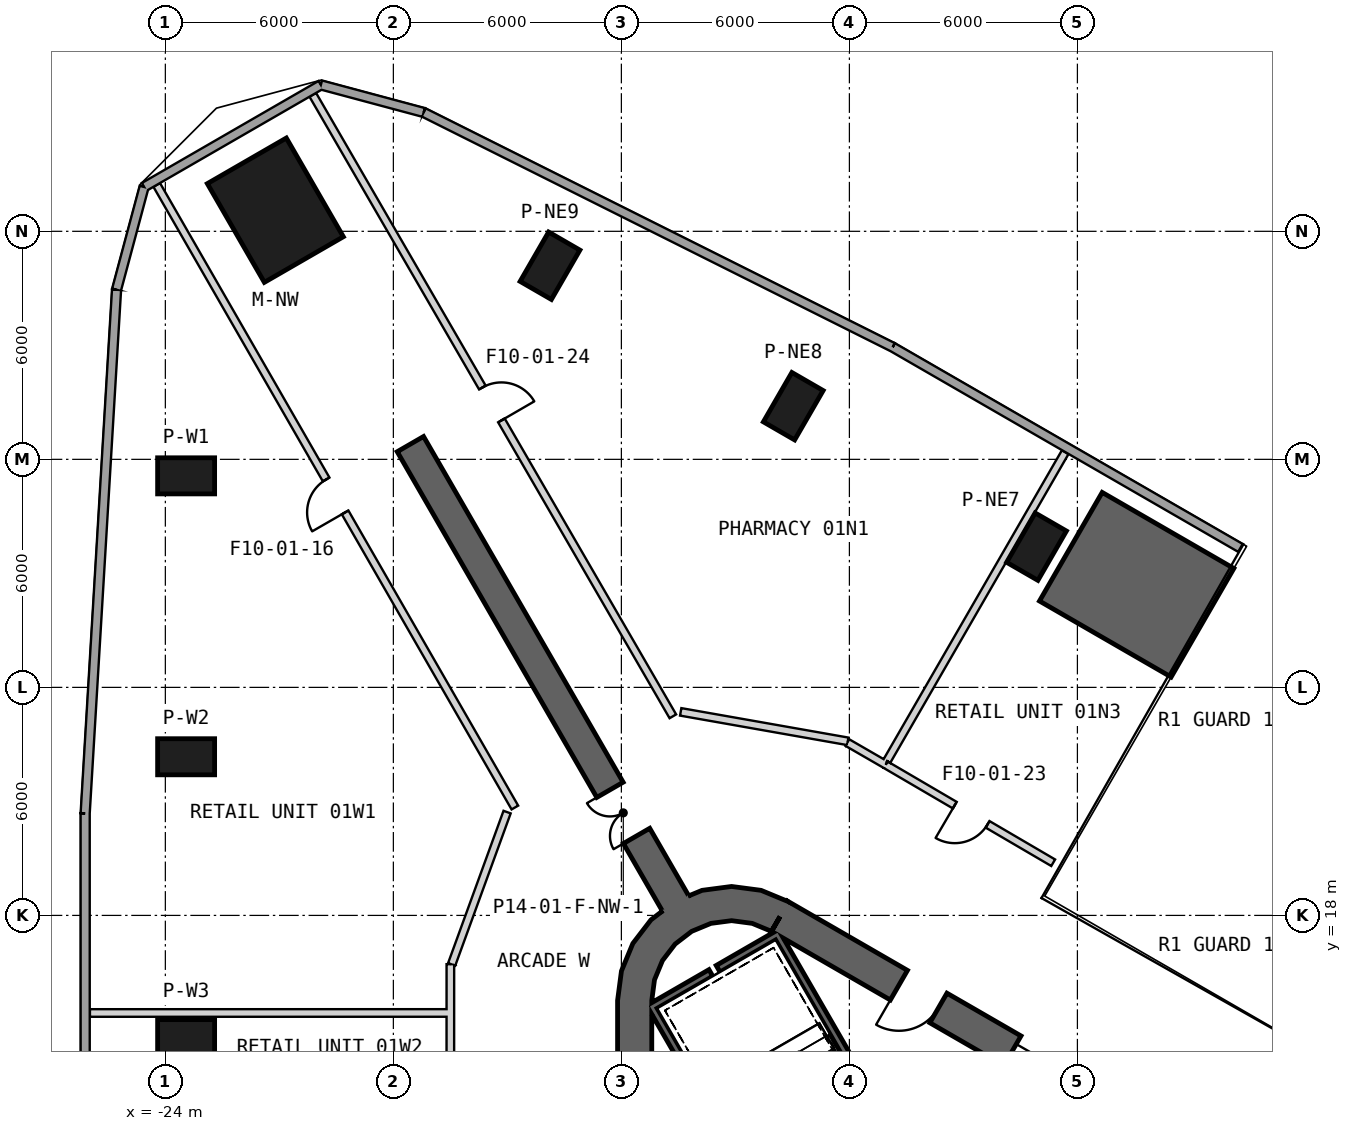
"""IFC4 building model, lengths in metres.
Left out: names, types, materials, properties, quantities, classifications, styles, units other than length and angle.
Written with IfcOpenShell. Run it as: python <this file> out.ifc"""

import sys

from ifc_helpers import new_model, si_unit, direction, frame, frame_2d, origin, origin_2d, place, context, subcontext, project, spatial, polyline, rectangle, outline, extrude, element, fill, save


model = new_model("IFC4")
c1 = context("Model", 3, precision=1e-05, world=origin(), true_north=direction((0.0, 1.0)))
c2 = subcontext(c1, "Body", "Model", "MODEL_VIEW")
j1 = project(units=[si_unit("LENGTHUNIT", "METRE"), si_unit("PLANEANGLEUNIT", "RADIAN")], contexts=[c1])
p1 = place(None, origin())
s1 = spatial("IfcSite", under=j1, at=p1, CompositionType="ELEMENT")
p2 = place(p1, origin())
s2 = spatial("IfcBuilding", under=s1, at=p2, CompositionType="ELEMENT")
p3 = place(p2, frame((0.0, 0.0, 9.0)))
s3 = spatial("IfcBuildingStorey", under=s2, at=p3, CompositionType="ELEMENT", Elevation=9.0)
p4 = place(p3, frame((-21.106, 36.556, 0.0), z_axis=(0.0, 0.0, 1.0), x_axis=(-0.5, 0.866025403784, 0.0)))
e1 = element("IfcColumn", 1, at=p4, inside=s3, PredefinedType="COLUMN", context=c2, shape_type="SweptSolid", body=[
    extrude(rectangle(XDim=3.0, YDim=2.4, at=origin_2d()), origin(), (0.0, 0.0, 1.0), 6.5),
])
for number, where, z_axis, x_axis in (
    (2, (-23.453, 29.566, 0.0), (0.0, 0.0, 1.0), (-1.0, 0.0, 0.0)),
    (3, (-23.453, 22.174, 0.0), (0.0, 0.0, 1.0), (-1.0, 0.0, 0.0)),
    (4, (-23.453, 14.783, 0.0), (0.0, 0.0, 1.0), (-1.0, 0.0, 0.0)),
    (5, (-1.076, 27.703, 0.0), (0.0, 0.0, 1.0), (0.5, 0.866, 0.0)),
    (6, (-7.477, 31.398, 0.0), (0.0, 0.0, 1.0), (0.5, 0.866, 0.0)),
    (7, (-13.878, 35.094, 0.0), (0.0, 0.0, 1.0), (0.5, 0.866, 0.0)),
):
    element("IfcColumn", number, at=place(p3, frame(where, z_axis=z_axis, x_axis=x_axis)), inside=s3, PredefinedType="COLUMN", context=c2, shape_type="SweptSolid", body=[
        extrude(rectangle(XDim=1.5, YDim=0.95, at=origin_2d()), origin(), (0.0, 0.0, 1.0), 6.5),
    ])
p5 = place(p3, frame((19.475, 2.208, 0.0), z_axis=(0.0, 0.0, 1.0), x_axis=(-0.866028369851, 0.499994862586, 0.0)))
e8 = element("IfcWall", 8, at=p5, inside=s3, PredefinedType="SHEAR", context=c2, shape_type="SweptSolid", body=[
    extrude(rectangle(XDim=31.523, YDim=0.9, at=frame_2d((15.762, 0.0))), origin(), (0.0, 0.0, 1.0), 6.5),
])
p6 = place(p5, frame((7.062, 0.0, 0.0)))
e9 = element("IfcOpeningElement", 9, at=p6, cuts=e8, PredefinedType="OPENING", context=c2, shape_type="SweptSolid", body=[
    extrude(rectangle(XDim=1.2, YDim=2.4, at=frame_2d((0.6, 1.2))), frame((0.0, 0.46, 0.0), z_axis=(0.0, -1.0, 0.0), x_axis=(1.0, 0.0, 0.0)), (0.0, 0.0, 1.0), 0.92),
])
p7 = place(p5, frame((9.762, 0.0, 0.0)))
e10 = element("IfcOpeningElement", 10, at=p7, cuts=e8, PredefinedType="OPENING", context=c2, shape_type="SweptSolid", body=[
    extrude(rectangle(XDim=1.2, YDim=2.4, at=frame_2d((0.6, 1.2))), frame((0.0, 0.46, 0.0), z_axis=(0.0, -1.0, 0.0), x_axis=(1.0, 0.0, 0.0)), (0.0, 0.0, 1.0), 0.92),
])
p8 = place(p5, frame((12.462, 0.0, 0.0)))
e11 = element("IfcOpeningElement", 11, at=p8, cuts=e8, PredefinedType="OPENING", context=c2, shape_type="SweptSolid", body=[
    extrude(rectangle(XDim=1.2, YDim=2.4, at=frame_2d((0.6, 1.2))), frame((0.0, 0.46, 0.0), z_axis=(0.0, -1.0, 0.0), x_axis=(1.0, 0.0, 0.0)), (0.0, 0.0, 1.0), 0.92),
])
p9 = place(p5, frame((15.162, 0.0, 0.0)))
e12 = element("IfcOpeningElement", 12, at=p9, cuts=e8, PredefinedType="OPENING", context=c2, shape_type="SweptSolid", body=[
    extrude(rectangle(XDim=1.2, YDim=2.4, at=frame_2d((0.6, 1.2))), frame((0.0, 0.46, 0.0), z_axis=(0.0, -1.0, 0.0), x_axis=(1.0, 0.0, 0.0)), (0.0, 0.0, 1.0), 0.92),
])
p10 = place(p5, frame((17.862, 0.0, 0.0)))
e13 = element("IfcOpeningElement", 13, at=p10, cuts=e8, PredefinedType="OPENING", context=c2, shape_type="SweptSolid", body=[
    extrude(rectangle(XDim=1.2, YDim=2.4, at=frame_2d((0.6, 1.2))), frame((0.0, 0.46, 0.0), z_axis=(0.0, -1.0, 0.0), x_axis=(1.0, 0.0, 0.0)), (0.0, 0.0, 1.0), 0.92),
])
p11 = place(p5, frame((20.562, 0.0, 0.0)))
e14 = element("IfcOpeningElement", 14, at=p11, cuts=e8, PredefinedType="OPENING", context=c2, shape_type="SweptSolid", body=[
    extrude(rectangle(XDim=1.2, YDim=2.4, at=frame_2d((0.6, 1.2))), frame((0.0, 0.46, 0.0), z_axis=(0.0, -1.0, 0.0), x_axis=(1.0, 0.0, 0.0)), (0.0, 0.0, 1.0), 0.92),
])
p12 = place(p5, frame((23.262, 0.0, 0.0)))
e15 = element("IfcOpeningElement", 15, at=p12, cuts=e8, PredefinedType="OPENING", context=c2, shape_type="SweptSolid", body=[
    extrude(rectangle(XDim=1.2, YDim=2.4, at=frame_2d((0.6, 1.2))), frame((0.0, 0.46, 0.0), z_axis=(0.0, -1.0, 0.0), x_axis=(1.0, 0.0, 0.0)), (0.0, 0.0, 1.0), 0.92),
])
p13 = place(p5, frame((3.612, 0.0, 0.0)))
e16 = element("IfcOpeningElement", 16, at=p13, cuts=e8, PredefinedType="OPENING", context=c2, shape_type="SweptSolid", body=[
    extrude(rectangle(XDim=1.2, YDim=2.4, at=frame_2d((0.6, 1.2))), frame((0.0, 0.46, 0.0), z_axis=(0.0, -1.0, 0.0), x_axis=(1.0, 0.0, 0.0)), (0.0, 0.0, 1.0), 0.92),
])
p14 = place(p5, frame((26.712, 0.0, 0.0)))
e17 = element("IfcOpeningElement", 17, at=p14, cuts=e8, PredefinedType="OPENING", context=c2, shape_type="SweptSolid", body=[
    extrude(rectangle(XDim=1.2, YDim=2.4, at=frame_2d((0.6, 1.2))), frame((0.0, 0.46, 0.0), z_axis=(0.0, -1.0, 0.0), x_axis=(1.0, 0.0, 0.0)), (0.0, 0.0, 1.0), 0.92),
])
p15 = place(p3, frame((-11.65, 15.762, 0.0), z_axis=(0.0, 0.0, 1.0), x_axis=(0.0, -1.0, 0.0)))
e18 = element("IfcWall", 18, at=p15, inside=s3, PredefinedType="SHEAR", context=c2, shape_type="SweptSolid", body=[
    extrude(rectangle(XDim=31.523, YDim=0.9, at=frame_2d((15.762, 0.0))), origin(), (0.0, 0.0, 1.0), 6.5),
])
p16 = place(p15, frame((7.062, 0.0, 0.0)))
e19 = element("IfcOpeningElement", 19, at=p16, cuts=e18, PredefinedType="OPENING", context=c2, shape_type="SweptSolid", body=[
    extrude(rectangle(XDim=1.2, YDim=2.4, at=frame_2d((0.6, 1.2))), frame((0.0, 0.46, 0.0), z_axis=(0.0, -1.0, 0.0), x_axis=(1.0, 0.0, 0.0)), (0.0, 0.0, 1.0), 0.92),
])
p17 = place(p15, frame((9.762, 0.0, 0.0)))
e20 = element("IfcOpeningElement", 20, at=p17, cuts=e18, PredefinedType="OPENING", context=c2, shape_type="SweptSolid", body=[
    extrude(rectangle(XDim=1.2, YDim=2.4, at=frame_2d((0.6, 1.2))), frame((0.0, 0.46, 0.0), z_axis=(0.0, -1.0, 0.0), x_axis=(1.0, 0.0, 0.0)), (0.0, 0.0, 1.0), 0.92),
])
p18 = place(p15, frame((12.462, 0.0, 0.0)))
e21 = element("IfcOpeningElement", 21, at=p18, cuts=e18, PredefinedType="OPENING", context=c2, shape_type="SweptSolid", body=[
    extrude(rectangle(XDim=1.2, YDim=2.4, at=frame_2d((0.6, 1.2))), frame((0.0, 0.46, 0.0), z_axis=(0.0, -1.0, 0.0), x_axis=(1.0, 0.0, 0.0)), (0.0, 0.0, 1.0), 0.92),
])
p19 = place(p15, frame((15.162, 0.0, 0.0)))
e22 = element("IfcOpeningElement", 22, at=p19, cuts=e18, PredefinedType="OPENING", context=c2, shape_type="SweptSolid", body=[
    extrude(rectangle(XDim=1.2, YDim=2.4, at=frame_2d((0.6, 1.2))), frame((0.0, 0.46, 0.0), z_axis=(0.0, -1.0, 0.0), x_axis=(1.0, 0.0, 0.0)), (0.0, 0.0, 1.0), 0.92),
])
p20 = place(p15, frame((17.862, 0.0, 0.0)))
e23 = element("IfcOpeningElement", 23, at=p20, cuts=e18, PredefinedType="OPENING", context=c2, shape_type="SweptSolid", body=[
    extrude(rectangle(XDim=1.2, YDim=2.4, at=frame_2d((0.6, 1.2))), frame((0.0, 0.46, 0.0), z_axis=(0.0, -1.0, 0.0), x_axis=(1.0, 0.0, 0.0)), (0.0, 0.0, 1.0), 0.92),
])
p21 = place(p15, frame((20.562, 0.0, 0.0)))
e24 = element("IfcOpeningElement", 24, at=p21, cuts=e18, PredefinedType="OPENING", context=c2, shape_type="SweptSolid", body=[
    extrude(rectangle(XDim=1.2, YDim=2.4, at=frame_2d((0.6, 1.2))), frame((0.0, 0.46, 0.0), z_axis=(0.0, -1.0, 0.0), x_axis=(1.0, 0.0, 0.0)), (0.0, 0.0, 1.0), 0.92),
])
p22 = place(p15, frame((23.262, 0.0, 0.0)))
e25 = element("IfcOpeningElement", 25, at=p22, cuts=e18, PredefinedType="OPENING", context=c2, shape_type="SweptSolid", body=[
    extrude(rectangle(XDim=1.2, YDim=2.4, at=frame_2d((0.6, 1.2))), frame((0.0, 0.46, 0.0), z_axis=(0.0, -1.0, 0.0), x_axis=(1.0, 0.0, 0.0)), (0.0, 0.0, 1.0), 0.92),
])
p23 = place(p15, frame((3.612, 0.0, 0.0)))
e26 = element("IfcOpeningElement", 26, at=p23, cuts=e18, PredefinedType="OPENING", context=c2, shape_type="SweptSolid", body=[
    extrude(rectangle(XDim=1.2, YDim=2.4, at=frame_2d((0.6, 1.2))), frame((0.0, 0.46, 0.0), z_axis=(0.0, -1.0, 0.0), x_axis=(1.0, 0.0, 0.0)), (0.0, 0.0, 1.0), 0.92),
])
p24 = place(p15, frame((26.712, 0.0, 0.0)))
e27 = element("IfcOpeningElement", 27, at=p24, cuts=e18, PredefinedType="OPENING", context=c2, shape_type="SweptSolid", body=[
    extrude(rectangle(XDim=1.2, YDim=2.4, at=frame_2d((0.6, 1.2))), frame((0.0, 0.46, 0.0), z_axis=(0.0, -1.0, 0.0), x_axis=(1.0, 0.0, 0.0)), (0.0, 0.0, 1.0), 0.92),
])
p25 = place(p3, origin())
e28 = element("IfcWall", 28, at=p25, inside=s3, PredefinedType="SHEAR", context=c2, shape_type="SweptSolid", body=[
    extrude(outline(polyline([(-7.6, 18.36), (-8.323, 18.659), (-9.1, 18.762), (-9.876, 18.659), (-10.6, 18.36), (-11.221, 17.883), (-11.698, 17.262), (-11.998, 16.538), (-12.1, 15.762), (-11.2, 15.762), (-11.128, 16.305), (-10.919, 16.812), (-10.585, 17.247), (-10.15, 17.58), (-9.644, 17.79), (-9.1, 17.862), (-8.556, 17.79), (-8.05, 17.58), (-7.6, 18.36)])), origin(), (0.0, 0.0, 1.0), 6.5),
])
p26 = place(p3, frame((-10.575, 18.316, 0.0), z_axis=(0.0, 0.0, 1.0), x_axis=(-0.499996575515, 0.866027380903, 0.0)))
e29 = element("IfcWall", 29, at=p26, inside=s3, PredefinedType="SHEAR", context=c2, shape_type="SweptSolid", body=[
    extrude(rectangle(XDim=13.954, YDim=0.8, at=frame_2d((6.977, 0.0))), origin(), (0.0, 0.0, 1.0), 6.5),
])
p27 = place(p26, frame((2.05, 0.0, 0.0)))
e30 = element("IfcOpeningElement", 30, at=p27, cuts=e29, PredefinedType="OPENING", context=c2, shape_type="SweptSolid", body=[
    extrude(rectangle(XDim=1.4, YDim=2.4, at=frame_2d((0.7, 1.2))), frame((0.0, 0.41, 0.0), z_axis=(0.0, -1.0, 0.0), x_axis=(1.0, 0.0, 0.0)), (0.0, 0.0, 1.0), 0.82),
])
p28 = place(p3, origin())
e31 = element("IfcWall", 31, at=p28, inside=s3, PredefinedType="SHEAR", context=c2, shape_type="SweptSolid", body=[
    extrude(outline(polyline([(4.116, 27.13), (0.652, 29.13), (-0.998, 26.272), (2.467, 24.272), (4.116, 27.13)])), origin(), (0.0, 0.0, 1.0), 6.5),
])
p29 = place(p3, frame((4.29, 27.67, 0.0), z_axis=(0.0, 0.0, 1.0), x_axis=(-0.866062075984, 0.499936476508, 0.0)))
e32 = element("IfcWall", 32, at=p29, inside=s3, PredefinedType="SOLIDWALL", context=c2, shape_type="SweptSolid", body=[
    extrude(rectangle(XDim=10.566, YDim=0.24, at=frame_2d((5.283, 0.0))), origin(), (0.0, 0.0, 1.0), 6.2),
])
p30 = place(p3, frame((-4.861, 32.952, 0.0), z_axis=(0.0, 0.0, 1.0), x_axis=(-0.894285628533, 0.447496608478, 0.0)))
e33 = element("IfcWall", 33, at=p30, inside=s3, PredefinedType="SOLIDWALL", context=c2, shape_type="SweptSolid", body=[
    extrude(rectangle(XDim=13.801, YDim=0.24, at=frame_2d((6.901, 0.0))), origin(), (0.0, 0.0, 1.0), 6.2),
])
p31 = place(p3, frame((-17.203, 39.128, 0.0), z_axis=(0.0, 0.0, 1.0), x_axis=(-0.965923146675, 0.25882904535, 0.0)))
e34 = element("IfcWall", 34, at=p31, inside=s3, PredefinedType="SOLIDWALL", context=c2, shape_type="SweptSolid", body=[
    extrude(rectangle(XDim=2.801, YDim=0.24, at=frame_2d((1.4, 0.0))), origin(), (0.0, 0.0, 1.0), 6.2),
])
p32 = place(p3, frame((-19.908, 39.853, 0.0), z_axis=(0.0, 0.0, 1.0), x_axis=(-0.866010734295, -0.500025407441, 0.0)))
e35 = element("IfcWall", 35, at=p32, inside=s3, PredefinedType="SOLIDWALL", context=c2, shape_type="SweptSolid", body=[
    extrude(rectangle(XDim=5.371, YDim=0.24, at=frame_2d((2.686, 0.0))), origin(), (0.0, 0.0, 1.0), 6.2),
])
p33 = place(p3, frame((-24.56, 37.167, 0.0), z_axis=(0.0, 0.0, 1.0), x_axis=(-0.258850842196, -0.965917305723, 0.0)))
e36 = element("IfcWall", 36, at=p33, inside=s3, PredefinedType="SOLIDWALL", context=c2, shape_type="SweptSolid", body=[
    extrude(rectangle(XDim=2.8, YDim=0.24, at=frame_2d((1.4, 0.0))), origin(), (0.0, 0.0, 1.0), 6.2),
])
p34 = place(p3, frame((-25.284, 34.462, 0.0), z_axis=(0.0, 0.0, 1.0), x_axis=(-0.059807686217, -0.998209918138, 0.0)))
e37 = element("IfcWall", 37, at=p34, inside=s3, PredefinedType="SOLIDWALL", context=c2, shape_type="SweptSolid", body=[
    extrude(rectangle(XDim=13.802, YDim=0.24, at=frame_2d((6.901, 0.0))), origin(), (0.0, 0.0, 1.0), 6.2),
])
p35 = place(p3, frame((-26.11, 20.685, 0.0), z_axis=(0.0, 0.0, 1.0), x_axis=(6.9319284e-05, -0.999999997597, 0.0)))
e38 = element("IfcWall", 38, at=p35, inside=s3, PredefinedType="SOLIDWALL", context=c2, shape_type="SweptSolid", body=[
    extrude(rectangle(XDim=10.566, YDim=0.24, at=frame_2d((5.283, 0.0))), origin(), (0.0, 0.0, 1.0), 6.2),
])
p36 = place(p3, frame((-4.158, 11.696, 0.0), z_axis=(0.0, 0.0, 1.0), x_axis=(0.508018930956, 0.861345903683, 0.0)))
e39 = element("IfcWall", 39, at=p36, inside=s3, PredefinedType="PLUMBINGWALL", context=c2, shape_type="SweptSolid", body=[
    extrude(rectangle(XDim=3.15, YDim=0.2, at=frame_2d((1.575, 0.0))), origin(), (0.0, 0.0, 1.0), 6.2),
])
p37 = place(p3, frame((-11.245, 15.678, -0.3), z_axis=(0.0, 0.0, 1.0), x_axis=(0.499977274689, -0.866038523851, 0.0)))
e40 = element("IfcWall", 40, at=p37, inside=s3, PredefinedType="SHEAR", context=c2, shape_type="SweptSolid", body=[
    extrude(rectangle(XDim=8.1, YDim=0.2, at=frame_2d((4.05, 0.0))), origin(), (0.0, 0.0, 1.0), 6.5),
])
p38 = place(p3, frame((-7.818, 17.541, -0.3), z_axis=(0.0, 0.0, 1.0), x_axis=(-0.866088799389, -0.499890179513, 0.0)))
e41 = element("IfcWall", 41, at=p38, inside=s3, PredefinedType="SHEAR", context=c2, shape_type="SweptSolid", body=[
    extrude(rectangle(XDim=1.89, YDim=0.2, at=frame_2d((0.945, 0.0))), origin(), (0.0, 0.0, 1.0), 6.5),
])
p39 = place(p3, frame((-9.645, 16.486, -0.3), z_axis=(0.0, 0.0, 1.0), x_axis=(-0.866038843867, -0.499976720371, 0.0)))
e42 = element("IfcWall", 42, at=p39, inside=s3, PredefinedType="SHEAR", context=c2, shape_type="SweptSolid", body=[
    extrude(rectangle(XDim=1.69, YDim=0.2, at=frame_2d((0.845, 0.0))), origin(), (0.0, 0.0, 1.0), 6.5),
])
p40 = place(p3, frame((-7.854, 17.405, -0.3), z_axis=(0.0, 0.0, 1.0), x_axis=(0.499997992926, -0.866026562566, 0.0)))
e43 = element("IfcWall", 43, at=p40, inside=s3, PredefinedType="SHEAR", context=c2, shape_type="SweptSolid", body=[
    extrude(rectangle(XDim=7.9, YDim=0.2, at=frame_2d((3.95, 0.0))), origin(), (0.0, 0.0, 1.0), 6.5),
])
p41 = place(p3, frame((-16.5, 16.717, 0.0), z_axis=(0.0, 0.0, 1.0), x_axis=(-0.000303914404, -0.999999953818, 0.0)))
e44 = element("IfcWall", 44, at=p41, inside=s3, PredefinedType="PARTITIONING", context=c2, shape_type="SweptSolid", body=[
    extrude(rectangle(XDim=4.017, YDim=0.2, at=frame_2d((2.008, 0.0))), origin(), (0.0, 0.0, 1.0), 5.38),
])
p42 = place(p3, frame((-15.007, 20.718, 0.0), z_axis=(0.0, 0.0, 1.0), x_axis=(-0.342060209064, -0.939678037083, 0.0)))
e45 = element("IfcWall", 45, at=p42, inside=s3, PredefinedType="PARTITIONING", context=c2, shape_type="SweptSolid", body=[
    extrude(rectangle(XDim=4.265, YDim=0.2, at=frame_2d((2.132, 0.0))), origin(), (0.0, 0.0, 1.0), 5.28),
])
p43 = place(p3, frame((-14.802, 20.838, 0.0), z_axis=(0.0, 0.0, 1.0), x_axis=(-0.498674250094, 0.866789474032, 0.0)))
e46 = element("IfcWall", 46, at=p43, inside=s3, PredefinedType="PARTITIONING", context=c2, shape_type="SweptSolid", body=[
    extrude(rectangle(XDim=18.9, YDim=0.2, at=frame_2d((9.45, 0.0))), origin(), (0.0, 0.0, 1.0), 6.2),
])
p44 = place(p43, frame((8.959, 0.0, 0.0)))
e47 = element("IfcOpeningElement", 47, at=p44, cuts=e46, PredefinedType="OPENING", context=c2, shape_type="SweptSolid", body=[
    extrude(rectangle(XDim=1.0, YDim=2.1, at=frame_2d((0.5, 1.05))), frame((0.0, 0.11, 0.0), z_axis=(0.0, -1.0, 0.0), x_axis=(1.0, 0.0, 0.0)), (0.0, 0.0, 1.0), 0.22),
])
p45 = place(p3, frame((-25.984, 15.432, 0.0), z_axis=(0.0, 0.0, 1.0), x_axis=(0.999999996954, 7.8047765e-05, 0.0)))
e48 = element("IfcWall", 48, at=p45, inside=s3, PredefinedType="PARTITIONING", context=c2, shape_type="SweptSolid", body=[
    extrude(rectangle(XDim=9.384, YDim=0.2, at=frame_2d((4.692, 0.0))), origin(), (0.0, 0.0, 1.0), 5.38),
])
p46 = place(p3, frame((-5.045, 21.965, 0.0), z_axis=(0.0, 0.0, 1.0), x_axis=(-0.866042521559, 0.499970349973, 0.0)))
e49 = element("IfcWall", 49, at=p46, inside=s3, PredefinedType="PARTITIONING", context=c2, shape_type="SweptSolid", body=[
    extrude(rectangle(XDim=1.165, YDim=0.2, at=frame_2d((0.583, 0.0))), origin(), (0.0, 0.0, 1.0), 5.38),
])
p47 = place(p3, frame((-0.637, 19.386, 0.0), z_axis=(0.0, 0.0, 1.0), x_axis=(-0.863122732054, 0.504994207305, 0.0)))
e50 = element("IfcWall", 50, at=p47, inside=s3, PredefinedType="PARTITIONING", context=c2, shape_type="SweptSolid", body=[
    extrude(rectangle(XDim=5.107, YDim=0.2, at=frame_2d((2.553, 0.0))), origin(), (0.0, 0.0, 1.0), 5.38),
])
p48 = place(p47, frame((2.0, 0.0, 0.0)))
e51 = element("IfcOpeningElement", 51, at=p48, cuts=e50, PredefinedType="OPENING", context=c2, shape_type="SweptSolid", body=[
    extrude(rectangle(XDim=1.0, YDim=2.1, at=frame_2d((0.5, 1.05))), frame((0.0, 0.11, 0.0), z_axis=(0.0, -1.0, 0.0), x_axis=(1.0, 0.0, 0.0)), (0.0, 0.0, 1.0), 0.22),
])
p49 = place(p3, frame((-20.12, 39.592, 0.0), z_axis=(0.0, 0.0, 1.0), x_axis=(0.501316309942, -0.865264096901, 0.0)))
e52 = element("IfcWall", 52, at=p49, inside=s3, PredefinedType="PARTITIONING", context=c2, shape_type="SweptSolid", body=[
    extrude(rectangle(XDim=18.899, YDim=0.2, at=frame_2d((9.45, 0.0))), origin(), (0.0, 0.0, 1.0), 6.2),
])
p50 = place(p49, frame((8.901, 0.0, 0.0)))
e53 = element("IfcOpeningElement", 53, at=p50, cuts=e52, PredefinedType="OPENING", context=c2, shape_type="SweptSolid", body=[
    extrude(rectangle(XDim=1.0, YDim=2.1, at=frame_2d((0.5, 1.05))), frame((0.0, 0.11, 0.0), z_axis=(0.0, -1.0, 0.0), x_axis=(1.0, 0.0, 0.0)), (0.0, 0.0, 1.0), 0.22),
])
p51 = place(p3, frame((-6.042, 22.581, 0.0), z_axis=(0.0, 0.0, 1.0), x_axis=(-0.984812172214, 0.173623113264, 0.0)))
e54 = element("IfcWall", 54, at=p51, inside=s3, PredefinedType="PARTITIONING", context=c2, shape_type="SweptSolid", body=[
    extrude(rectangle(XDim=4.465, YDim=0.2, at=frame_2d((2.232, 0.0))), origin(), (0.0, 0.0, 1.0), 5.28),
])
p52 = place(p3, frame((-5.012, 22.062, 0.0), z_axis=(0.0, 0.0, 1.0), x_axis=(0.499922928987, 0.866069896182, 0.0)))
e55 = element("IfcWall", 55, at=p52, inside=s3, PredefinedType="PARTITIONING", context=c2, shape_type="SweptSolid", body=[
    extrude(rectangle(XDim=9.382, YDim=0.2, at=frame_2d((4.691, 0.0))), origin(), (0.0, 0.0, 1.0), 6.2),
])
p53 = place(p44, origin())
e56 = element("IfcDoor", 56, at=p53, inside=s3, OperationType="SINGLE_SWING_LEFT", PredefinedType="USERDEFINED", context=c2, shape_type="SweptSolid", body=[
    extrude(rectangle(XDim=1.0, YDim=2.1, at=frame_2d((0.5, 1.05))), frame((0.0, 0.025, 0.0), z_axis=(0.0, -1.0, 0.0), x_axis=(1.0, 0.0, 0.0)), (0.0, 0.0, 1.0), 0.05),
])
fill(e47, e56)
p54 = place(p48, origin())
e57 = element("IfcDoor", 57, at=p54, inside=s3, OperationType="SINGLE_SWING_RIGHT", PredefinedType="USERDEFINED", context=c2, shape_type="SweptSolid", body=[
    extrude(rectangle(XDim=1.0, YDim=2.1, at=frame_2d((0.5, 1.05))), frame((0.0, 0.025, 0.0), z_axis=(0.0, -1.0, 0.0), x_axis=(1.0, 0.0, 0.0)), (0.0, 0.0, 1.0), 0.05),
])
fill(e51, e57)
p55 = place(p50, origin())
e58 = element("IfcDoor", 58, at=p55, inside=s3, OperationType="SINGLE_SWING_RIGHT", PredefinedType="USERDEFINED", context=c2, shape_type="SweptSolid", body=[
    extrude(rectangle(XDim=1.0, YDim=2.1, at=frame_2d((0.5, 1.05))), frame((0.0, 0.025, 0.0), z_axis=(0.0, -1.0, 0.0), x_axis=(1.0, 0.0, 0.0)), (0.0, 0.0, 1.0), 0.05),
])
fill(e53, e58)
p56 = place(p12, origin())
e59 = element("IfcDoor", 59, at=p56, inside=s3, OperationType="SLIDING_TO_LEFT", PredefinedType="USERDEFINED", context=c2, shape_type="SweptSolid", body=[
    extrude(rectangle(XDim=1.2, YDim=2.4, at=frame_2d((0.6, 1.2))), frame((0.0, 0.025, 0.0), z_axis=(0.0, -1.0, 0.0), x_axis=(1.0, 0.0, 0.0)), (0.0, 0.0, 1.0), 0.05),
])
fill(e15, e59)
p57 = place(p14, origin())
e60 = element("IfcDoor", 60, at=p57, inside=s3, OperationType="SINGLE_SWING_RIGHT", PredefinedType="USERDEFINED", context=c2, shape_type="SweptSolid", body=[
    extrude(rectangle(XDim=1.2, YDim=2.4, at=frame_2d((0.6, 1.2))), frame((0.0, 0.025, 0.0), z_axis=(0.0, -1.0, 0.0), x_axis=(1.0, 0.0, 0.0)), (0.0, 0.0, 1.0), 0.05),
])
fill(e17, e60)
p58 = place(p27, origin())
e61 = element("IfcDoor", 61, at=p58, inside=s3, OperationType="DOUBLE_DOOR_SINGLE_SWING", PredefinedType="NOTDEFINED", context=c2, shape_type="SweptSolid", body=[
    extrude(rectangle(XDim=1.4, YDim=2.4, at=frame_2d((0.7, 1.2))), frame((0.0, 0.025, 0.0), z_axis=(0.0, -1.0, 0.0), x_axis=(1.0, 0.0, 0.0)), (0.0, 0.0, 1.0), 0.05),
])
fill(e30, e61)
save(model, sys.argv[1])
